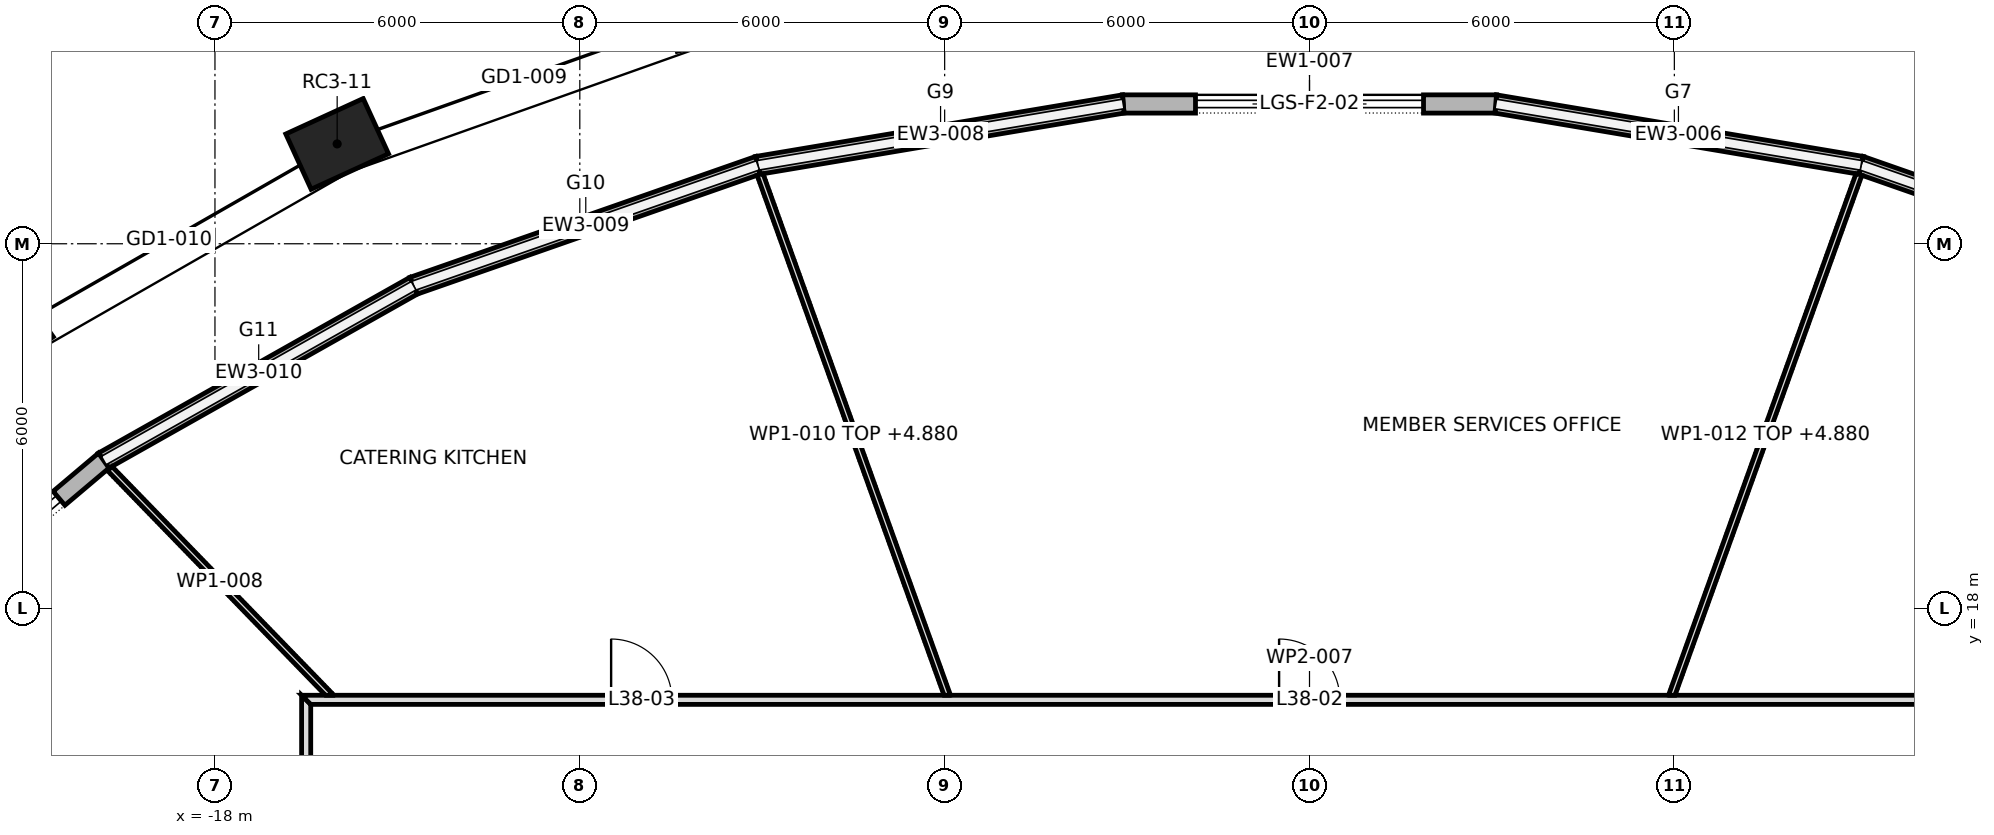
"""IFC4 building model, lengths in metres.
Left out: names, types, materials, properties, quantities, classifications, styles, units other than length and angle.
Written with IfcOpenShell. Run it as: python <this file> out.ifc"""

import sys

from ifc_helpers import new_model, si_unit, direction, frame, frame_2d, origin, origin_2d, place, context, subcontext, project, spatial, polyline, rectangle, outline, extrude, element, fill, save


model = new_model("IFC4")
c1 = context("Model", 3, precision=1e-05, world=origin(), true_north=direction((0.0, 1.0)))
c2 = subcontext(c1, "Body", "Model", "MODEL_VIEW")
j1 = project(units=[si_unit("LENGTHUNIT", "METRE"), si_unit("PLANEANGLEUNIT", "RADIAN")], contexts=[c1])
p1 = place(None, origin())
s1 = spatial("IfcSite", under=j1, at=p1, CompositionType="ELEMENT")
p2 = place(p1, origin())
s2 = spatial("IfcBuilding", under=s1, at=p2, CompositionType="ELEMENT")
p3 = place(p2, frame((0.0, 0.0, 167.5)))
s3 = spatial("IfcBuildingStorey", under=s2, at=p3, CompositionType="ELEMENT", Elevation=167.5)
for number, where, z_axis, x_axis in (
    (1, (-15.99, 25.642, 0.0), (0.0, 0.0, 1.0), (-0.909, -0.417, 0.0)),
    (2, (-21.519, 22.475, 0.0), (0.0, 0.0, 1.0), (-0.818, -0.575, 0.0)),
):
    element("IfcColumn", number, at=place(p3, frame(where, z_axis=z_axis, x_axis=x_axis)), inside=s3, PredefinedType="COLUMN", context=c2, shape_type="SweptSolid", body=[
        extrude(rectangle(XDim=1.4, YDim=1.0, at=origin_2d()), origin(), (0.0, 0.0, 1.0), 6.0),
    ])
p4 = place(p3, frame((14.732, 23.31, 5.2), z_axis=(0.0, 0.0, 1.0), x_axis=(-0.943944636678, 0.330103806228, 0.0)))
e3 = element("IfcWall", 3, at=p4, inside=s3, PredefinedType="STANDARD", context=c2, shape_type="SweptSolid", body=[
    extrude(outline(polyline([(-0.013, -0.15), (6.01, -0.15), (5.985, 0.15), (0.013, 0.15), (-0.013, -0.15)])), origin(), (0.0, 0.0, 1.0), 0.45),
])
p5 = place(p3, frame((9.071, 25.29, 5.2), z_axis=(0.0, 0.0, 1.0), x_axis=(-0.98618955457, 0.165620537547, 0.0)))
e4 = element("IfcWall", 4, at=p5, inside=s3, PredefinedType="STANDARD", context=c2, shape_type="SweptSolid", body=[
    extrude(outline(polyline([(-0.013, -0.15), (6.105, -0.15), (6.08, 0.15), (0.013, 0.15), (-0.013, -0.15)])), origin(), (0.0, 0.0, 1.0), 0.45),
])
p6 = place(p3, frame((3.063, 26.299, 0.0), z_axis=(0.0, 0.0, 1.0), x_axis=(-1.0, 0.0, 0.0)))
e5 = element("IfcWall", 5, at=p6, inside=s3, PredefinedType="STANDARD", context=c2, shape_type="SweptSolid", body=[
    extrude(outline(polyline([(-0.012, -0.15), (6.138, -0.15), (6.114, 0.15), (0.012, 0.15), (-0.012, -0.15)])), origin(), (0.0, 0.0, 1.0), 5.65),
])
p7 = place(p6, frame((1.188, 0.0, 0.0)))
e6 = element("IfcOpeningElement", 6, at=p7, cuts=e5, PredefinedType="OPENING", context=c2, shape_type="SweptSolid", body=[
    extrude(rectangle(XDim=3.75, YDim=5.2, at=frame_2d((1.875, 2.6))), frame((0.0, 0.162, 0.0), z_axis=(0.0, -1.0, 0.0), x_axis=(1.0, 0.0, 0.0)), (0.0, 0.0, 1.0), 0.324),
])
p8 = place(p3, frame((-3.063, 26.299, 5.2), z_axis=(0.0, 0.0, 1.0), x_axis=(-0.98618955457, -0.165620537547, 0.0)))
e7 = element("IfcWall", 7, at=p8, inside=s3, PredefinedType="STANDARD", context=c2, shape_type="SweptSolid", body=[
    extrude(outline(polyline([(-0.012, -0.15), (6.105, -0.15), (6.08, 0.15), (0.012, 0.15), (-0.012, -0.15)])), origin(), (0.0, 0.0, 1.0), 0.45),
])
p9 = place(p3, frame((-9.071, 25.29, 5.2), z_axis=(0.0, 0.0, 1.0), x_axis=(-0.943944636678, -0.330103806228, 0.0)))
e8 = element("IfcWall", 8, at=p9, inside=s3, PredefinedType="STANDARD", context=c2, shape_type="SweptSolid", body=[
    extrude(outline(polyline([(-0.013, -0.15), (6.011, -0.15), (5.984, 0.15), (0.013, 0.15), (-0.013, -0.15)])), origin(), (0.0, 0.0, 1.0), 0.45),
])
p10 = place(p3, frame((-14.732, 23.31, 5.2), z_axis=(0.0, 0.0, 1.0), x_axis=(-0.870982130072, -0.491314694565, 0.0)))
e9 = element("IfcWall", 9, at=p10, inside=s3, PredefinedType="STANDARD", context=c2, shape_type="SweptSolid", body=[
    extrude(outline(polyline([(-0.013, -0.15), (5.866, -0.15), (5.837, 0.15), (0.013, 0.15), (-0.013, -0.15)])), origin(), (0.0, 0.0, 1.0), 0.45),
])
p11 = place(p3, frame((-19.829, 20.435, 0.0), z_axis=(0.0, 0.0, 1.0), x_axis=(-0.764076096085, -0.645126126732, 0.0)))
e10 = element("IfcWall", 10, at=p11, inside=s3, PredefinedType="STANDARD", context=c2, shape_type="SweptSolid", body=[
    extrude(outline(polyline([(-0.014, -0.15), (5.69, -0.15), (5.66, 0.15), (0.014, 0.15), (-0.014, -0.15)])), origin(), (0.0, 0.0, 1.0), 5.65),
])
p12 = place(p11, frame((0.962, 0.0, 0.0)))
e11 = element("IfcOpeningElement", 11, at=p12, cuts=e10, PredefinedType="OPENING", context=c2, shape_type="SweptSolid", body=[
    extrude(rectangle(XDim=3.75, YDim=5.2, at=frame_2d((1.875, 2.6))), frame((0.0, 0.162, 0.0), z_axis=(0.0, -1.0, 0.0), x_axis=(1.0, 0.0, 0.0)), (0.0, 0.0, 1.0), 0.324),
])
p13 = place(p3, frame((-16.5, 1.37, 0.0), z_axis=(0.0, 0.0, 1.0), x_axis=(0.0, 1.0, 0.0)))
e12 = element("IfcWall", 12, at=p13, inside=s3, PredefinedType="PARTITIONING", context=c2, shape_type="SweptSolid", body=[
    extrude(outline(polyline([(0.0, -0.075), (1.882, -0.075), (3.764, -0.075), (5.646, -0.075), (7.527, -0.075), (9.409, -0.075), (11.291, -0.075), (13.173, -0.075), (15.055, -0.075), (15.205, 0.075), (13.304, 0.075), (11.404, 0.075), (9.503, 0.075), (7.603, 0.075), (5.702, 0.075), (3.801, 0.075), (1.901, 0.075), (0.0, 0.075), (0.0, -0.075)])), origin(), (0.0, 0.0, 1.0), 5.65),
])
p14 = place(p13, frame((6.665, 0.0, 0.0)))
e13 = element("IfcOpeningElement", 13, at=p14, cuts=e12, PredefinedType="OPENING", context=c2, shape_type="SweptSolid", body=[
    extrude(rectangle(XDim=1.8, YDim=2.1, at=frame_2d((0.9, 1.05))), frame((0.0, 0.087, 0.0), z_axis=(0.0, -1.0, 0.0), x_axis=(1.0, 0.0, 0.0)), (0.0, 0.0, 1.0), 0.174),
])
p15 = place(p3, frame((-16.575, 16.5, 0.0), z_axis=(0.0, 0.0, 1.0), x_axis=(1.0, 0.0, 0.0)))
e14 = element("IfcWall", 14, at=p15, inside=s3, PredefinedType="PARTITIONING", context=c2, shape_type="SweptSolid", body=[
    extrude(outline(polyline([(0.15, -0.075), (2.082, -0.075), (4.015, -0.075), (5.947, -0.075), (7.879, -0.075), (9.812, -0.075), (11.744, -0.075), (13.677, -0.075), (15.609, -0.075), (17.541, -0.075), (19.473, -0.075), (21.406, -0.075), (23.338, -0.075), (25.271, -0.075), (27.203, -0.075), (29.135, -0.075), (31.068, -0.075), (33.0, -0.075), (33.15, 0.075), (31.2, 0.075), (29.25, 0.075), (27.3, 0.075), (25.35, 0.075), (23.4, 0.075), (21.45, 0.075), (19.5, 0.075), (17.55, 0.075), (15.6, 0.075), (13.65, 0.075), (11.7, 0.075), (9.75, 0.075), (7.8, 0.075), (5.85, 0.075), (3.9, 0.075), (1.95, 0.075), (0.0, 0.075), (0.15, -0.075)])), origin(), (0.0, 0.0, 1.0), 5.65),
])
p16 = place(p15, frame((27.29, 0.0, 0.0)))
e15 = element("IfcOpeningElement", 15, at=p16, cuts=e14, PredefinedType="OPENING", context=c2, shape_type="SweptSolid", body=[
    extrude(rectangle(XDim=1.0, YDim=2.1, at=frame_2d((0.5, 1.05))), frame((0.0, 0.087, 0.0), z_axis=(0.0, -1.0, 0.0), x_axis=(1.0, 0.0, 0.0)), (0.0, 0.0, 1.0), 0.174),
])
p17 = place(p15, frame((16.075, 0.0, 0.0)))
e16 = element("IfcOpeningElement", 16, at=p17, cuts=e14, PredefinedType="OPENING", context=c2, shape_type="SweptSolid", body=[
    extrude(rectangle(XDim=1.0, YDim=2.1, at=frame_2d((0.5, 1.05))), frame((0.0, 0.087, 0.0), z_axis=(0.0, -1.0, 0.0), x_axis=(1.0, 0.0, 0.0)), (0.0, 0.0, 1.0), 0.174),
])
p18 = place(p15, frame((5.09, 0.0, 0.0)))
e17 = element("IfcOpeningElement", 17, at=p18, cuts=e14, PredefinedType="OPENING", context=c2, shape_type="SweptSolid", body=[
    extrude(rectangle(XDim=1.0, YDim=2.1, at=frame_2d((0.5, 1.05))), frame((0.0, 0.087, 0.0), z_axis=(0.0, -1.0, 0.0), x_axis=(1.0, 0.0, 0.0)), (0.0, 0.0, 1.0), 0.174),
])
p19 = place(p3, frame((-16.079, 16.541, 0.0), z_axis=(0.0, 0.0, 1.0), x_axis=(-0.696335683959, 0.717716249812, 0.0)))
e18 = element("IfcWall", 18, at=p19, inside=s3, PredefinedType="PARTITIONING", context=c2, shape_type="SweptSolid", body=[
    extrude(outline(polyline([(5.241, 0.05), (3.526, 0.05), (1.812, 0.05), (0.097, 0.05), (0.0, -0.05), (0.0, -0.05), (1.747, -0.05), (3.494, -0.05), (5.241, -0.05), (5.241, 0.05)])), origin(), (0.0, 0.0, 1.0), 5.65),
])
p20 = place(p3, frame((-5.951, 16.558, 0.0), z_axis=(0.0, 0.0, 1.0), x_axis=(-0.338285385043, 0.94104356874, 0.0)))
e19 = element("IfcWall", 19, at=p20, inside=s3, PredefinedType="PARTITIONING", context=c2, shape_type="SweptSolid", body=[
    extrude(outline(polyline([(0.0, -0.05), (1.823, -0.05), (3.646, -0.05), (5.468, -0.05), (7.291, -0.05), (9.114, -0.05), (9.122, -0.003), (9.122, 0.006), (9.122, 0.05), (7.305, 0.05), (5.488, 0.05), (3.67, 0.05), (1.853, 0.05), (0.036, 0.05), (0.0, -0.049), (0.0, -0.05)])), origin(), (0.0, 0.0, 1.0), 4.88),
])
p21 = place(p3, frame((5.951, 16.558, 0.0), z_axis=(0.0, 0.0, 1.0), x_axis=(0.338285385043, 0.94104356874, 0.0)))
e20 = element("IfcWall", 20, at=p21, inside=s3, PredefinedType="PARTITIONING", context=c2, shape_type="SweptSolid", body=[
    extrude(outline(polyline([(9.122, -0.05), (9.122, -0.006), (9.122, 0.003), (9.114, 0.05), (7.291, 0.05), (5.468, 0.05), (3.646, 0.05), (1.823, 0.05), (0.0, 0.05), (0.0, 0.049), (0.036, -0.05), (1.853, -0.05), (3.67, -0.05), (5.488, -0.05), (7.305, -0.05), (9.122, -0.05)])), origin(), (0.0, 0.0, 1.0), 4.88),
])
p22 = place(p7, origin())
e21 = element("IfcDoor", 21, at=p22, inside=s3, OperationType="DOUBLE_DOOR_SLIDING", PredefinedType="DOOR", context=c2, shape_type="SweptSolid", body=[
    extrude(rectangle(XDim=3.75, YDim=5.2, at=frame_2d((1.875, 2.6))), frame((0.0, 0.025, 0.0), z_axis=(0.0, -1.0, 0.0), x_axis=(1.0, 0.0, 0.0)), (0.0, 0.0, 1.0), 0.05),
])
fill(e6, e21)
p23 = place(p12, origin())
e22 = element("IfcDoor", 22, at=p23, inside=s3, OperationType="DOUBLE_DOOR_SLIDING", PredefinedType="DOOR", context=c2, shape_type="SweptSolid", body=[
    extrude(rectangle(XDim=3.75, YDim=5.2, at=frame_2d((1.875, 2.6))), frame((0.0, 0.025, 0.0), z_axis=(0.0, -1.0, 0.0), x_axis=(1.0, 0.0, 0.0)), (0.0, 0.0, 1.0), 0.05),
])
fill(e11, e22)
p24 = place(p17, origin())
e23 = element("IfcDoor", 23, at=p24, inside=s3, OperationType="SINGLE_SWING_RIGHT", PredefinedType="DOOR", context=c2, shape_type="SweptSolid", body=[
    extrude(rectangle(XDim=1.0, YDim=2.1, at=frame_2d((0.5, 1.05))), frame((0.0, 0.025, 0.0), z_axis=(0.0, -1.0, 0.0), x_axis=(1.0, 0.0, 0.0)), (0.0, 0.0, 1.0), 0.05),
])
fill(e16, e23)
p25 = place(p18, origin())
e24 = element("IfcDoor", 24, at=p25, inside=s3, OperationType="SINGLE_SWING_RIGHT", PredefinedType="DOOR", context=c2, shape_type="SweptSolid", body=[
    extrude(rectangle(XDim=1.0, YDim=2.1, at=frame_2d((0.5, 1.05))), frame((0.0, 0.025, 0.0), z_axis=(0.0, -1.0, 0.0), x_axis=(1.0, 0.0, 0.0)), (0.0, 0.0, 1.0), 0.05),
])
fill(e17, e24)
save(model, sys.argv[1])
